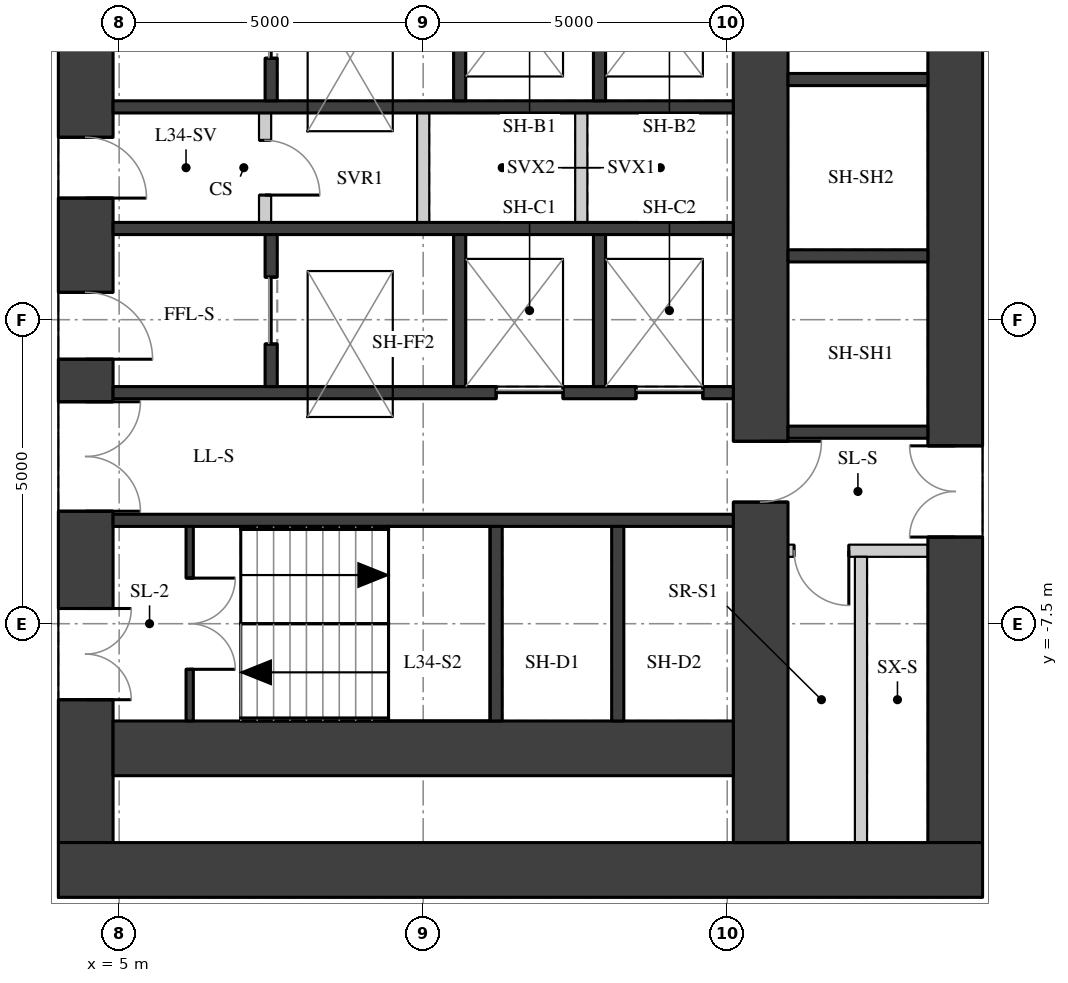
"""IFC4 building model, lengths in metres.
Left out: names, types, materials, properties, quantities, classifications, styles, units other than length and angle.
Written with IfcOpenShell. Run it as: python <this file> out.ifc"""

import sys

from ifc_helpers import new_model, si_unit, direction, frame, frame_2d, origin, place, context, subcontext, project, spatial, rectangle, extrude, element, fill, save


model = new_model("IFC4")
c1 = context("Model", 3, precision=1e-05, world=origin(), true_north=direction((0.0, 1.0)))
c2 = subcontext(c1, "Body", "Model", "MODEL_VIEW")
j1 = project(units=[si_unit("LENGTHUNIT", "METRE"), si_unit("PLANEANGLEUNIT", "RADIAN")], contexts=[c1])
p1 = place(None, origin())
s1 = spatial("IfcSite", under=j1, at=p1, CompositionType="ELEMENT")
p2 = place(p1, origin())
s2 = spatial("IfcBuilding", under=s1, at=p2, CompositionType="ELEMENT")
p3 = place(p2, frame((0.0, 0.0, 121.9)))
s3 = spatial("IfcBuildingStorey", under=s2, at=p3, CompositionType="ELEMENT", Elevation=121.9)
p4 = place(p3, frame((4.45, -11.1, 0.0), z_axis=(0.0, 0.0, 1.0), x_axis=(0.0, 1.0, 0.0)))
e1 = element("IfcWall", 1, at=p4, inside=s3, PredefinedType="SHEAR", context=c2, shape_type="SweptSolid", body=[
    extrude(rectangle(XDim=22.2, YDim=0.9, at=frame_2d((11.1, 0.0))), origin(), (0.0, 0.0, 1.0), 3.02),
])
p5 = place(p4, frame((2.35, 0.0, 0.0)))
e2 = element("IfcOpeningElement", 2, at=p5, cuts=e1, PredefinedType="OPENING", context=c2, shape_type="SweptSolid", body=[
    extrude(rectangle(XDim=1.5, YDim=2.1, at=frame_2d((0.75, 1.05))), frame((0.0, 0.46, 0.0), z_axis=(0.0, -1.0, 0.0), x_axis=(1.0, 0.0, 0.0)), (0.0, 0.0, 1.0), 0.92),
])
p6 = place(p4, frame((5.45, 0.0, 0.0)))
e3 = element("IfcOpeningElement", 3, at=p6, cuts=e1, PredefinedType="OPENING", context=c2, shape_type="SweptSolid", body=[
    extrude(rectangle(XDim=1.8, YDim=2.1, at=frame_2d((0.9, 1.05))), frame((0.0, 0.46, 0.0), z_axis=(0.0, -1.0, 0.0), x_axis=(1.0, 0.0, 0.0)), (0.0, 0.0, 1.0), 0.92),
])
p7 = place(p4, frame((7.95, 0.0, 0.0)))
e4 = element("IfcOpeningElement", 4, at=p7, cuts=e1, PredefinedType="OPENING", context=c2, shape_type="SweptSolid", body=[
    extrude(rectangle(XDim=1.1, YDim=2.1, at=frame_2d((0.55, 1.05))), frame((0.0, 0.46, 0.0), z_axis=(0.0, -1.0, 0.0), x_axis=(1.0, 0.0, 0.0)), (0.0, 0.0, 1.0), 0.92),
])
p8 = place(p4, frame((10.6, 0.0, 0.0)))
e5 = element("IfcOpeningElement", 5, at=p8, cuts=e1, PredefinedType="OPENING", context=c2, shape_type="SweptSolid", body=[
    extrude(rectangle(XDim=1.0, YDim=2.1, at=frame_2d((0.5, 1.05))), frame((0.0, 0.46, 0.0), z_axis=(0.0, -1.0, 0.0), x_axis=(1.0, 0.0, 0.0)), (0.0, 0.0, 1.0), 0.92),
])
p9 = place(p4, frame((13.15, 0.0, 0.0)))
e6 = element("IfcOpeningElement", 6, at=p9, cuts=e1, PredefinedType="OPENING", context=c2, shape_type="SweptSolid", body=[
    extrude(rectangle(XDim=1.1, YDim=2.1, at=frame_2d((0.55, 1.05))), frame((0.0, 0.46, 0.0), z_axis=(0.0, -1.0, 0.0), x_axis=(1.0, 0.0, 0.0)), (0.0, 0.0, 1.0), 0.92),
])
p10 = place(p4, frame((14.95, 0.0, 0.0)))
e7 = element("IfcOpeningElement", 7, at=p10, cuts=e1, PredefinedType="OPENING", context=c2, shape_type="SweptSolid", body=[
    extrude(rectangle(XDim=1.8, YDim=2.1, at=frame_2d((0.9, 1.05))), frame((0.0, 0.46, 0.0), z_axis=(0.0, -1.0, 0.0), x_axis=(1.0, 0.0, 0.0)), (0.0, 0.0, 1.0), 0.92),
])
p11 = place(p4, frame((18.35, 0.0, 0.0)))
e8 = element("IfcOpeningElement", 8, at=p11, cuts=e1, PredefinedType="OPENING", context=c2, shape_type="SweptSolid", body=[
    extrude(rectangle(XDim=1.5, YDim=2.1, at=frame_2d((0.75, 1.05))), frame((0.0, 0.46, 0.0), z_axis=(0.0, -1.0, 0.0), x_axis=(1.0, 0.0, 0.0)), (0.0, 0.0, 1.0), 0.92),
])
p12 = place(p3, frame((18.75, -11.1, 0.0), z_axis=(0.0, 0.0, 1.0), x_axis=(0.0, 1.0, 0.0)))
e9 = element("IfcWall", 9, at=p12, inside=s3, PredefinedType="SHEAR", context=c2, shape_type="SweptSolid", body=[
    extrude(rectangle(XDim=22.2, YDim=0.9, at=frame_2d((11.1, 0.0))), origin(), (0.0, 0.0, 1.0), 3.02),
])
p13 = place(p12, frame((16.175, 0.0, 0.0)))
e10 = element("IfcOpeningElement", 10, at=p13, cuts=e9, PredefinedType="OPENING", context=c2, shape_type="SweptSolid", body=[
    extrude(rectangle(XDim=1.5, YDim=2.1, at=frame_2d((0.75, 1.05))), frame((0.0, 0.46, 0.0), z_axis=(0.0, -1.0, 0.0), x_axis=(1.0, 0.0, 0.0)), (0.0, 0.0, 1.0), 0.92),
])
p14 = place(p12, frame((5.025, 0.0, 0.0)))
e11 = element("IfcOpeningElement", 11, at=p14, cuts=e9, PredefinedType="OPENING", context=c2, shape_type="SweptSolid", body=[
    extrude(rectangle(XDim=1.5, YDim=2.1, at=frame_2d((0.75, 1.05))), frame((0.0, 0.46, 0.0), z_axis=(0.0, -1.0, 0.0), x_axis=(1.0, 0.0, 0.0)), (0.0, 0.0, 1.0), 0.92),
])
p15 = place(p3, frame((4.0, -11.55, 0.0), z_axis=(0.0, 0.0, 1.0), x_axis=(1.0, 0.0, 0.0)))
e12 = element("IfcWall", 12, at=p15, inside=s3, PredefinedType="SHEAR", context=c2, shape_type="SweptSolid", body=[
    extrude(rectangle(XDim=15.2, YDim=0.9, at=frame_2d((7.6, 0.0))), origin(), (0.0, 0.0, 1.0), 3.02),
])
p16 = place(p3, frame((15.55, -11.1, 0.0), z_axis=(0.0, 0.0, 1.0), x_axis=(0.0, 1.0, 0.0)))
e13 = element("IfcWall", 13, at=p16, inside=s3, PredefinedType="SHEAR", context=c2, shape_type="SweptSolid", body=[
    extrude(rectangle(XDim=22.2, YDim=0.9, at=frame_2d((11.1, 0.0))), origin(), (0.0, 0.0, 1.0), 3.02),
])
p17 = place(p16, frame((15.6, 0.0, 0.0)))
e14 = element("IfcOpeningElement", 14, at=p17, cuts=e13, PredefinedType="OPENING", context=c2, shape_type="SweptSolid", body=[
    extrude(rectangle(XDim=1.0, YDim=2.1, at=frame_2d((0.5, 1.05))), frame((0.0, 0.46, 0.0), z_axis=(0.0, -1.0, 0.0), x_axis=(1.0, 0.0, 0.0)), (0.0, 0.0, 1.0), 0.92),
])
p18 = place(p16, frame((5.6, 0.0, 0.0)))
e15 = element("IfcOpeningElement", 15, at=p18, cuts=e13, PredefinedType="OPENING", context=c2, shape_type="SweptSolid", body=[
    extrude(rectangle(XDim=1.0, YDim=2.1, at=frame_2d((0.5, 1.05))), frame((0.0, 0.46, 0.0), z_axis=(0.0, -1.0, 0.0), x_axis=(1.0, 0.0, 0.0)), (0.0, 0.0, 1.0), 0.92),
])
p19 = place(p3, frame((4.9, -9.55, 0.0), z_axis=(0.0, 0.0, 1.0), x_axis=(1.0, 0.0, 0.0)))
e16 = element("IfcWall", 16, at=p19, inside=s3, PredefinedType="SHEAR", context=c2, shape_type="SweptSolid", body=[
    extrude(rectangle(XDim=10.2, YDim=0.9, at=frame_2d((5.1, 0.0))), origin(), (0.0, 0.0, 1.0), 3.02),
])
for number, where, z_axis, x_axis in (
    (17, (4.9, 1.0, 0.0), (0.0, 0.0, 1.0), (1.0, 0.0, 0.0)),
    (18, (4.9, -1.0, 0.0), (0.0, 0.0, 1.0), (1.0, 0.0, 0.0)),
):
    element("IfcWall", number, at=place(p3, frame(where, z_axis=z_axis, x_axis=x_axis)), inside=s3, PredefinedType="SHEAR", context=c2, shape_type="SweptSolid", body=[
        extrude(rectangle(XDim=10.2, YDim=0.2, at=frame_2d((5.1, 0.0))), origin(), (0.0, 0.0, 1.0), 3.02),
    ])
p20 = place(p3, frame((4.9, -3.7, 0.0), z_axis=(0.0, 0.0, 1.0), x_axis=(1.0, 0.0, 0.0)))
e19 = element("IfcWall", 19, at=p20, inside=s3, PredefinedType="SHEAR", context=c2, shape_type="SweptSolid", body=[
    extrude(rectangle(XDim=10.2, YDim=0.2, at=frame_2d((5.1, 0.0))), origin(), (0.0, 0.0, 1.0), 3.02),
])
p21 = place(p20, frame((6.3, 0.0, 0.0)))
e20 = element("IfcOpeningElement", 20, at=p21, cuts=e19, PredefinedType="OPENING", context=c2, shape_type="SweptSolid", body=[
    extrude(rectangle(XDim=1.1, YDim=2.1, at=frame_2d((0.55, 1.05))), frame((0.0, 0.11, 0.0), z_axis=(0.0, -1.0, 0.0), x_axis=(1.0, 0.0, 0.0)), (0.0, 0.0, 1.0), 0.22),
])
p22 = place(p20, frame((8.6, 0.0, 0.0)))
e21 = element("IfcOpeningElement", 21, at=p22, cuts=e19, PredefinedType="OPENING", context=c2, shape_type="SweptSolid", body=[
    extrude(rectangle(XDim=1.1, YDim=2.1, at=frame_2d((0.55, 1.05))), frame((0.0, 0.11, 0.0), z_axis=(0.0, -1.0, 0.0), x_axis=(1.0, 0.0, 0.0)), (0.0, 0.0, 1.0), 0.22),
])
p23 = place(p3, frame((4.9, -5.8, 0.0), z_axis=(0.0, 0.0, 1.0), x_axis=(1.0, 0.0, 0.0)))
e22 = element("IfcWall", 22, at=p23, inside=s3, PredefinedType="SHEAR", context=c2, shape_type="SweptSolid", body=[
    extrude(rectangle(XDim=10.2, YDim=0.2, at=frame_2d((5.1, 0.0))), origin(), (0.0, 0.0, 1.0), 3.02),
])
for number, where, z_axis, x_axis in (
    (23, (11.2, -9.1, 0.0), (0.0, 0.0, 1.0), (0.0, 1.0, 0.0)),
    (24, (13.2, -9.1, 0.0), (0.0, 0.0, 1.0), (0.0, 1.0, 0.0)),
):
    element("IfcWall", number, at=place(p3, frame(where, z_axis=z_axis, x_axis=x_axis)), inside=s3, PredefinedType="SHEAR", context=c2, shape_type="SweptSolid", body=[
        extrude(rectangle(XDim=3.2, YDim=0.2, at=frame_2d((1.6, 0.0))), origin(), (0.0, 0.0, 1.0), 3.02),
    ])
p24 = place(p3, frame((7.5, 1.1, 0.0), z_axis=(0.0, 0.0, 1.0), x_axis=(0.0, 1.0, 0.0)))
e25 = element("IfcWall", 25, at=p24, inside=s3, PredefinedType="SHEAR", context=c2, shape_type="SweptSolid", body=[
    extrude(rectangle(XDim=2.5, YDim=0.2, at=frame_2d((1.25, 0.0))), origin(), (0.0, 0.0, 1.0), 3.02),
])
p25 = place(p24, frame((0.7, 0.0, 0.0)))
e26 = element("IfcOpeningElement", 26, at=p25, cuts=e25, PredefinedType="OPENING", context=c2, shape_type="SweptSolid", body=[
    extrude(rectangle(XDim=1.1, YDim=2.1, at=frame_2d((0.55, 1.05))), frame((0.0, 0.11, 0.0), z_axis=(0.0, -1.0, 0.0), x_axis=(1.0, 0.0, 0.0)), (0.0, 0.0, 1.0), 0.22),
])
p26 = place(p3, frame((7.5, -3.6, 0.0), z_axis=(0.0, 0.0, 1.0), x_axis=(0.0, 1.0, 0.0)))
e27 = element("IfcWall", 27, at=p26, inside=s3, PredefinedType="SHEAR", context=c2, shape_type="SweptSolid", body=[
    extrude(rectangle(XDim=2.5, YDim=0.2, at=frame_2d((1.25, 0.0))), origin(), (0.0, 0.0, 1.0), 3.02),
])
p27 = place(p26, frame((0.7, 0.0, 0.0)))
e28 = element("IfcOpeningElement", 28, at=p27, cuts=e27, PredefinedType="OPENING", context=c2, shape_type="SweptSolid", body=[
    extrude(rectangle(XDim=1.1, YDim=2.1, at=frame_2d((0.55, 1.05))), frame((0.0, 0.11, 0.0), z_axis=(0.0, -1.0, 0.0), x_axis=(1.0, 0.0, 0.0)), (0.0, 0.0, 1.0), 0.22),
])
for number, where, z_axis, x_axis in (
    (29, (10.6, 1.1, 0.0), (0.0, 0.0, 1.0), (0.0, 1.0, 0.0)),
    (30, (10.6, -3.6, 0.0), (0.0, 0.0, 1.0), (0.0, 1.0, 0.0)),
    (31, (12.9, 1.1, 0.0), (0.0, 0.0, 1.0), (0.0, 1.0, 0.0)),
    (32, (12.9, -3.6, 0.0), (0.0, 0.0, 1.0), (0.0, 1.0, 0.0)),
):
    element("IfcWall", number, at=place(p3, frame(where, z_axis=z_axis, x_axis=x_axis)), inside=s3, PredefinedType="SHEAR", context=c2, shape_type="SweptSolid", body=[
        extrude(rectangle(XDim=2.5, YDim=0.2, at=frame_2d((1.25, 0.0))), origin(), (0.0, 0.0, 1.0), 3.02),
    ])
p28 = place(p3, frame((6.16, -9.1, 0.0), z_axis=(0.0, 0.0, 1.0), x_axis=(0.0, 1.0, 0.0)))
e33 = element("IfcWall", 33, at=p28, inside=s3, PredefinedType="SHEAR", context=c2, shape_type="SweptSolid", body=[
    extrude(rectangle(XDim=3.2, YDim=0.12, at=frame_2d((1.6, 0.0))), origin(), (0.0, 0.0, 1.0), 3.02),
])
p29 = place(p28, frame((0.85, 0.0, 0.0)))
e34 = element("IfcOpeningElement", 34, at=p29, cuts=e33, PredefinedType="OPENING", context=c2, shape_type="SweptSolid", body=[
    extrude(rectangle(XDim=1.5, YDim=2.1, at=frame_2d((0.75, 1.05))), frame((0.0, 0.07, 0.0), z_axis=(0.0, -1.0, 0.0), x_axis=(1.0, 0.0, 0.0)), (0.0, 0.0, 1.0), 0.14),
])
p30 = place(p3, frame((7.4, -0.9, 0.0), z_axis=(0.0, 0.0, 1.0), x_axis=(0.0, 1.0, 0.0)))
e35 = element("IfcWall", 35, at=p30, inside=s3, PredefinedType="PARTITIONING", context=c2, shape_type="SweptSolid", body=[
    extrude(rectangle(XDim=1.8, YDim=0.2, at=frame_2d((0.9, 0.0))), origin(), (0.0, 0.0, 1.0), 3.02),
])
p31 = place(p30, frame((0.45, 0.0, 0.0)))
e36 = element("IfcOpeningElement", 36, at=p31, cuts=e35, PredefinedType="OPENING", context=c2, shape_type="SweptSolid", body=[
    extrude(rectangle(XDim=0.9, YDim=2.1, at=frame_2d((0.45, 1.05))), frame((0.0, 0.11, 0.0), z_axis=(0.0, -1.0, 0.0), x_axis=(1.0, 0.0, 0.0)), (0.0, 0.0, 1.0), 0.22),
])
for number, where, z_axis, x_axis in (
    (37, (10.0, -0.9, 0.0), (0.0, 0.0, 1.0), (0.0, 1.0, 0.0)),
    (38, (12.6, -0.9, 0.0), (0.0, 0.0, 1.0), (0.0, 1.0, 0.0)),
):
    element("IfcWall", number, at=place(p3, frame(where, z_axis=z_axis, x_axis=x_axis)), inside=s3, PredefinedType="PARTITIONING", context=c2, shape_type="SweptSolid", body=[
        extrude(rectangle(XDim=1.8, YDim=0.2, at=frame_2d((0.9, 0.0))), origin(), (0.0, 0.0, 1.0), 3.02),
    ])
for number, where, z_axis, x_axis in (
    (39, (16.0, -4.35, 0.0), (0.0, 0.0, 1.0), (1.0, 0.0, 0.0)),
    (40, (16.0, -1.45, 0.0), (0.0, 0.0, 1.0), (1.0, 0.0, 0.0)),
    (41, (16.0, 1.45, 0.0), (0.0, 0.0, 1.0), (1.0, 0.0, 0.0)),
):
    element("IfcWall", number, at=place(p3, frame(where, z_axis=z_axis, x_axis=x_axis)), inside=s3, PredefinedType="SHEAR", context=c2, shape_type="SweptSolid", body=[
        extrude(rectangle(XDim=2.3, YDim=0.2, at=frame_2d((1.15, 0.0))), origin(), (0.0, 0.0, 1.0), 3.02),
    ])
p32 = place(p3, frame((16.0, -6.3, 0.0), z_axis=(0.0, 0.0, 1.0), x_axis=(1.0, 0.0, 0.0)))
e42 = element("IfcWall", 42, at=p32, inside=s3, PredefinedType="PARTITIONING", context=c2, shape_type="SweptSolid", body=[
    extrude(rectangle(XDim=2.3, YDim=0.2, at=frame_2d((1.15, 0.0))), origin(), (0.0, 0.0, 1.0), 3.02),
])
p33 = place(p32, frame((0.1, 0.0, 0.0)))
e43 = element("IfcOpeningElement", 43, at=p33, cuts=e42, PredefinedType="OPENING", context=c2, shape_type="SweptSolid", body=[
    extrude(rectangle(XDim=0.9, YDim=2.1, at=frame_2d((0.45, 1.05))), frame((0.0, 0.11, 0.0), z_axis=(0.0, -1.0, 0.0), x_axis=(1.0, 0.0, 0.0)), (0.0, 0.0, 1.0), 0.22),
])
p34 = place(p3, frame((17.2, -11.1, 0.0), z_axis=(0.0, 0.0, 1.0), x_axis=(0.0, 1.0, 0.0)))
e44 = element("IfcWall", 44, at=p34, inside=s3, PredefinedType="PARTITIONING", context=c2, shape_type="SweptSolid", body=[
    extrude(rectangle(XDim=4.7, YDim=0.2, at=frame_2d((2.35, 0.0))), origin(), (0.0, 0.0, 1.0), 3.02),
])
p35 = place(p5, origin())
e45 = element("IfcDoor", 45, at=p35, inside=s3, OperationType="DOUBLE_DOOR_SINGLE_SWING", PredefinedType="DOOR", context=c2, shape_type="SweptSolid", body=[
    extrude(rectangle(XDim=1.5, YDim=2.1, at=frame_2d((0.75, 1.05))), frame((0.0, 0.025, 0.0), z_axis=(0.0, -1.0, 0.0), x_axis=(1.0, 0.0, 0.0)), (0.0, 0.0, 1.0), 0.05),
])
fill(e2, e45)
p36 = place(p6, origin())
e46 = element("IfcDoor", 46, at=p36, inside=s3, OperationType="DOUBLE_DOOR_SINGLE_SWING", PredefinedType="DOOR", context=c2, shape_type="SweptSolid", body=[
    extrude(rectangle(XDim=1.8, YDim=2.1, at=frame_2d((0.9, 1.05))), frame((0.0, 0.025, 0.0), z_axis=(0.0, -1.0, 0.0), x_axis=(1.0, 0.0, 0.0)), (0.0, 0.0, 1.0), 0.05),
])
fill(e3, e46)
p37 = place(p7, origin())
e47 = element("IfcDoor", 47, at=p37, inside=s3, OperationType="SINGLE_SWING_RIGHT", PredefinedType="DOOR", context=c2, shape_type="SweptSolid", body=[
    extrude(rectangle(XDim=1.1, YDim=2.1, at=frame_2d((0.55, 1.05))), frame((0.0, 0.025, 0.0), z_axis=(0.0, -1.0, 0.0), x_axis=(1.0, 0.0, 0.0)), (0.0, 0.0, 1.0), 0.05),
])
fill(e4, e47)
p38 = place(p8, origin())
e48 = element("IfcDoor", 48, at=p38, inside=s3, OperationType="SINGLE_SWING_RIGHT", PredefinedType="DOOR", context=c2, shape_type="SweptSolid", body=[
    extrude(rectangle(XDim=1.0, YDim=2.1, at=frame_2d((0.5, 1.05))), frame((0.0, 0.025, 0.0), z_axis=(0.0, -1.0, 0.0), x_axis=(1.0, 0.0, 0.0)), (0.0, 0.0, 1.0), 0.05),
])
fill(e5, e48)
p39 = place(p14, origin())
e49 = element("IfcDoor", 49, at=p39, inside=s3, OperationType="DOUBLE_DOOR_SINGLE_SWING", PredefinedType="DOOR", context=c2, shape_type="SweptSolid", body=[
    extrude(rectangle(XDim=1.5, YDim=2.1, at=frame_2d((0.75, 1.05))), frame((0.0, 0.025, 0.0), z_axis=(0.0, -1.0, 0.0), x_axis=(1.0, 0.0, 0.0)), (0.0, 0.0, 1.0), 0.05),
])
fill(e11, e49)
p40 = place(p29, origin())
e50 = element("IfcDoor", 50, at=p40, inside=s3, OperationType="DOUBLE_DOOR_SINGLE_SWING", PredefinedType="DOOR", context=c2, shape_type="SweptSolid", body=[
    extrude(rectangle(XDim=1.5, YDim=2.1, at=frame_2d((0.75, 1.05))), frame((0.0, 0.025, 0.0), z_axis=(0.0, -1.0, 0.0), x_axis=(1.0, 0.0, 0.0)), (0.0, 0.0, 1.0), 0.05),
])
fill(e34, e50)
p41 = place(p21, origin())
e51 = element("IfcDoor", 51, at=p41, inside=s3, OperationType="DOUBLE_DOOR_SLIDING", PredefinedType="DOOR", context=c2, shape_type="SweptSolid", body=[
    extrude(rectangle(XDim=1.1, YDim=2.1, at=frame_2d((0.55, 1.05))), frame((0.0, 0.025, 0.0), z_axis=(0.0, -1.0, 0.0), x_axis=(1.0, 0.0, 0.0)), (0.0, 0.0, 1.0), 0.05),
])
fill(e20, e51)
p42 = place(p22, origin())
e52 = element("IfcDoor", 52, at=p42, inside=s3, OperationType="DOUBLE_DOOR_SLIDING", PredefinedType="DOOR", context=c2, shape_type="SweptSolid", body=[
    extrude(rectangle(XDim=1.1, YDim=2.1, at=frame_2d((0.55, 1.05))), frame((0.0, 0.025, 0.0), z_axis=(0.0, -1.0, 0.0), x_axis=(1.0, 0.0, 0.0)), (0.0, 0.0, 1.0), 0.05),
])
fill(e21, e52)
p43 = place(p25, origin())
e53 = element("IfcDoor", 53, at=p43, inside=s3, OperationType="DOUBLE_DOOR_SLIDING", PredefinedType="DOOR", context=c2, shape_type="SweptSolid", body=[
    extrude(rectangle(XDim=1.1, YDim=2.1, at=frame_2d((0.55, 1.05))), frame((0.0, 0.025, 0.0), z_axis=(0.0, -1.0, 0.0), x_axis=(1.0, 0.0, 0.0)), (0.0, 0.0, 1.0), 0.05),
])
fill(e26, e53)
p44 = place(p27, origin())
e54 = element("IfcDoor", 54, at=p44, inside=s3, OperationType="DOUBLE_DOOR_SLIDING", PredefinedType="DOOR", context=c2, shape_type="SweptSolid", body=[
    extrude(rectangle(XDim=1.1, YDim=2.1, at=frame_2d((0.55, 1.05))), frame((0.0, 0.025, 0.0), z_axis=(0.0, -1.0, 0.0), x_axis=(1.0, 0.0, 0.0)), (0.0, 0.0, 1.0), 0.05),
])
fill(e28, e54)
p45 = place(p31, origin())
e55 = element("IfcDoor", 55, at=p45, inside=s3, OperationType="SINGLE_SWING_RIGHT", PredefinedType="DOOR", context=c2, shape_type="SweptSolid", body=[
    extrude(rectangle(XDim=0.9, YDim=2.1, at=frame_2d((0.45, 1.05))), frame((0.0, 0.025, 0.0), z_axis=(0.0, -1.0, 0.0), x_axis=(1.0, 0.0, 0.0)), (0.0, 0.0, 1.0), 0.05),
])
fill(e36, e55)
p46 = place(p18, origin())
e56 = element("IfcDoor", 56, at=p46, inside=s3, OperationType="SINGLE_SWING_LEFT", PredefinedType="DOOR", context=c2, shape_type="SweptSolid", body=[
    extrude(rectangle(XDim=1.0, YDim=2.1, at=frame_2d((0.5, 1.05))), frame((0.0, 0.025, 0.0), z_axis=(0.0, -1.0, 0.0), x_axis=(1.0, 0.0, 0.0)), (0.0, 0.0, 1.0), 0.05),
])
fill(e15, e56)
p47 = place(p33, origin())
e57 = element("IfcDoor", 57, at=p47, inside=s3, OperationType="SINGLE_SWING_LEFT", PredefinedType="DOOR", context=c2, shape_type="SweptSolid", body=[
    extrude(rectangle(XDim=0.9, YDim=2.1, at=frame_2d((0.45, 1.05))), frame((0.0, 0.025, 0.0), z_axis=(0.0, -1.0, 0.0), x_axis=(1.0, 0.0, 0.0)), (0.0, 0.0, 1.0), 0.05),
])
fill(e43, e57)
save(model, sys.argv[1])
